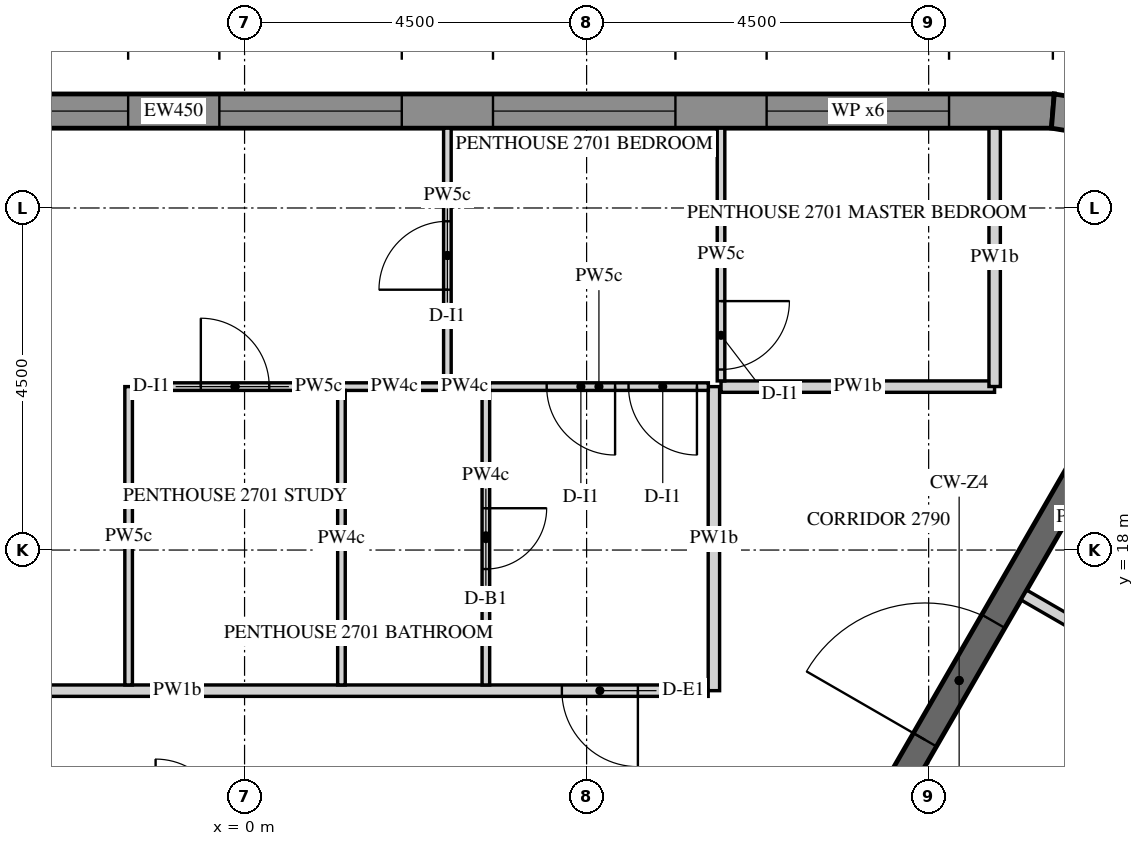
"""IFC4 building model, lengths in metres.
Left out: names, types, materials, properties, quantities, classifications, styles, units other than length and angle.
Written with IfcOpenShell. Run it as: python <this file> out.ifc"""

import sys

from ifc_helpers import new_model, si_unit, direction, frame, frame_2d, origin, place, context, subcontext, project, spatial, polyline, rectangle, outline, extrude, element, fill, save


model = new_model("IFC4")
c1 = context("Model", 3, precision=1e-05, world=origin(), true_north=direction((0.0, 1.0)))
c2 = subcontext(c1, "Body", "Model", "MODEL_VIEW")
j1 = project(units=[si_unit("LENGTHUNIT", "METRE"), si_unit("PLANEANGLEUNIT", "RADIAN")], contexts=[c1])
p1 = place(None, origin())
s1 = spatial("IfcSite", under=j1, at=p1, CompositionType="ELEMENT")
p2 = place(p1, origin())
s2 = spatial("IfcBuilding", under=s1, at=p2, CompositionType="ELEMENT")
p3 = place(p2, frame((0.0, 0.0, 353.4)))
s3 = spatial("IfcBuildingStorey", under=s2, at=p3, CompositionType="ELEMENT", Elevation=353.4)
p4 = place(p3, frame((10.634, 23.775, -0.15), z_axis=(0.0, 0.0, 1.0), x_axis=(-1.0, 0.0, 0.0)))
e1 = element("IfcWall", 1, at=p4, inside=s3, PredefinedType="SOLIDWALL", context=c2, shape_type="SweptSolid", body=[
    extrude(outline(polyline([(-0.018, -0.225), (23.153, -0.225), (23.111, 0.225), (0.018, 0.225), (-0.018, -0.225)])), origin(), (0.0, 0.0, 1.0), 3.9),
])
p5 = place(p4, frame((1.366, 0.0, 0.45)))
e2 = element("IfcOpeningElement", 2, at=p5, cuts=e1, PredefinedType="OPENING", context=c2, shape_type="SweptSolid", body=[
    extrude(rectangle(XDim=2.4, YDim=3.0, at=frame_2d((1.2, 1.5))), frame((0.0, 0.235, 0.0), z_axis=(0.0, -1.0, 0.0), x_axis=(1.0, 0.0, 0.0)), (0.0, 0.0, 1.0), 0.47),
])
p6 = place(p4, frame((4.966, 0.0, 0.45)))
e3 = element("IfcOpeningElement", 3, at=p6, cuts=e1, PredefinedType="OPENING", context=c2, shape_type="SweptSolid", body=[
    extrude(rectangle(XDim=2.4, YDim=3.0, at=frame_2d((1.2, 1.5))), frame((0.0, 0.235, 0.0), z_axis=(0.0, -1.0, 0.0), x_axis=(1.0, 0.0, 0.0)), (0.0, 0.0, 1.0), 0.47),
])
p7 = place(p4, frame((8.566, 0.0, 0.45)))
e4 = element("IfcOpeningElement", 4, at=p7, cuts=e1, PredefinedType="OPENING", context=c2, shape_type="SweptSolid", body=[
    extrude(rectangle(XDim=2.4, YDim=3.0, at=frame_2d((1.2, 1.5))), frame((0.0, 0.235, 0.0), z_axis=(0.0, -1.0, 0.0), x_axis=(1.0, 0.0, 0.0)), (0.0, 0.0, 1.0), 0.47),
])
p8 = place(p4, frame((12.166, 0.0, 0.45)))
e5 = element("IfcOpeningElement", 5, at=p8, cuts=e1, PredefinedType="OPENING", context=c2, shape_type="SweptSolid", body=[
    extrude(rectangle(XDim=2.4, YDim=3.0, at=frame_2d((1.2, 1.5))), frame((0.0, 0.235, 0.0), z_axis=(0.0, -1.0, 0.0), x_axis=(1.0, 0.0, 0.0)), (0.0, 0.0, 1.0), 0.47),
])
p9 = place(p4, frame((15.766, 0.0, 0.45)))
e6 = element("IfcOpeningElement", 6, at=p9, cuts=e1, PredefinedType="OPENING", context=c2, shape_type="SweptSolid", body=[
    extrude(rectangle(XDim=2.4, YDim=3.0, at=frame_2d((1.2, 1.5))), frame((0.0, 0.235, 0.0), z_axis=(0.0, -1.0, 0.0), x_axis=(1.0, 0.0, 0.0)), (0.0, 0.0, 1.0), 0.47),
])
p10 = place(p4, frame((19.366, 0.0, 0.45)))
e7 = element("IfcOpeningElement", 7, at=p10, cuts=e1, PredefinedType="OPENING", context=c2, shape_type="SweptSolid", body=[
    extrude(rectangle(XDim=2.4, YDim=3.0, at=frame_2d((1.2, 1.5))), frame((0.0, 0.235, 0.0), z_axis=(0.0, -1.0, 0.0), x_axis=(1.0, 0.0, 0.0)), (0.0, 0.0, 1.0), 0.47),
])
p11 = place(p3, frame((11.843, 23.576, -0.15), z_axis=(0.0, 0.0, 1.0), x_axis=(-0.986773862881, 0.162102879475, 0.0)))
e8 = element("IfcWall", 8, at=p11, inside=s3, PredefinedType="SOLIDWALL", context=c2, shape_type="SweptSolid", body=[
    extrude(outline(polyline([(-0.037, -0.225), (1.243, -0.225), (1.206, 0.225), (0.037, 0.225), (-0.037, -0.225)])), origin(), (0.0, 0.0, 1.0), 3.9),
])
p12 = place(p3, frame((5.773, 10.0, -0.15), z_axis=(0.0, 0.0, 1.0), x_axis=(0.500007911273, 0.866020836161, 0.0)))
e9 = element("IfcWall", 9, at=p12, inside=s3, PredefinedType="SHEAR", context=c2, shape_type="SweptSolid", body=[
    extrude(rectangle(XDim=14.51, YDim=0.35, at=frame_2d((7.255, 0.0))), origin(), (0.0, 0.0, 1.0), 3.9),
])
p13 = place(p12, frame((6.355, 0.0, 0.15)))
e10 = element("IfcOpeningElement", 10, at=p13, cuts=e9, PredefinedType="OPENING", context=c2, shape_type="SweptSolid", body=[
    extrude(rectangle(XDim=1.8, YDim=2.4, at=frame_2d((0.9, 1.2))), frame((0.0, 0.185, 0.0), z_axis=(0.0, -1.0, 0.0), x_axis=(1.0, 0.0, 0.0)), (0.0, 0.0, 1.0), 0.37),
])
p14 = place(p3, frame((6.1, 16.15, 0.0), z_axis=(0.0, 0.0, 1.0), x_axis=(-1.0, 0.0, 0.0)))
e11 = element("IfcWall", 11, at=p14, inside=s3, PredefinedType="PARTITIONING", context=c2, shape_type="SweptSolid", body=[
    extrude(rectangle(XDim=13.966, YDim=0.15, at=frame_2d((6.983, 0.0))), origin(), (0.0, 0.0, 1.0), 2.82),
])
p15 = place(p14, frame((0.925, 0.0, 0.0)))
e12 = element("IfcOpeningElement", 12, at=p15, cuts=e11, PredefinedType="OPENING", context=c2, shape_type="SweptSolid", body=[
    extrude(rectangle(XDim=1.0, YDim=2.1, at=frame_2d((0.5, 1.05))), frame((0.0, 0.085, 0.0), z_axis=(0.0, -1.0, 0.0), x_axis=(1.0, 0.0, 0.0)), (0.0, 0.0, 1.0), 0.17),
])
p16 = place(p3, frame((6.175, 20.15, 0.0), z_axis=(0.0, 0.0, 1.0), x_axis=(0.0, -1.0, 0.0)))
e13 = element("IfcWall", 13, at=p16, inside=s3, PredefinedType="PARTITIONING", context=c2, shape_type="SweptSolid", body=[
    extrude(rectangle(XDim=4.0, YDim=0.15, at=frame_2d((2.0, 0.0))), origin(), (0.0, 0.0, 1.0), 2.82),
])
p17 = place(p3, frame((9.867, 20.15, 0.0), z_axis=(0.0, 0.0, 1.0), x_axis=(-1.0, 0.0, 0.0)))
e14 = element("IfcWall", 14, at=p17, inside=s3, PredefinedType="PARTITIONING", context=c2, shape_type="SweptSolid", body=[
    extrude(rectangle(XDim=3.599, YDim=0.15, at=frame_2d((1.799, 0.0))), origin(), (0.0, 0.0, 1.0), 2.82),
])
p18 = place(p3, frame((9.868, 23.55, 0.0), z_axis=(0.0, 0.0, 1.0), x_axis=(0.0, -1.0, 0.0)))
e15 = element("IfcWall", 15, at=p18, inside=s3, PredefinedType="PARTITIONING", context=c2, shape_type="SweptSolid", body=[
    extrude(rectangle(XDim=3.399, YDim=0.15, at=frame_2d((1.699, 0.0))), origin(), (0.0, 0.0, 1.0), 2.82),
])
p19 = place(p3, frame((9.142, 11.885, 0.0), z_axis=(0.0, 0.0, 1.0), x_axis=(0.500004822225, 0.866022619654, 0.0)))
e16 = element("IfcWall", 16, at=p19, inside=s3, PredefinedType="PARTITIONING", context=c2, shape_type="SweptSolid", body=[
    extrude(rectangle(XDim=5.339, YDim=0.15, at=frame_2d((2.669, 0.0))), origin(), (0.0, 0.0, 1.0), 2.82),
])
p20 = place(p3, frame((11.747, 16.546, 0.0), z_axis=(0.0, 0.0, 1.0), x_axis=(-0.866013532718, 0.500020560727, 0.0)))
e17 = element("IfcWall", 17, at=p20, inside=s3, PredefinedType="PARTITIONING", context=c2, shape_type="SweptSolid", body=[
    extrude(rectangle(XDim=1.725, YDim=0.15, at=frame_2d((0.863, 0.0))), origin(), (0.0, 0.0, 1.0), 2.82),
])
p21 = place(p3, frame((1.275, 20.15, 0.0), z_axis=(0.0, 0.0, 1.0), x_axis=(1.0, 0.0, 0.0)))
e18 = element("IfcWall", 18, at=p21, inside=s3, PredefinedType="PARTITIONING", context=c2, shape_type="SweptSolid", body=[
    extrude(rectangle(XDim=1.396, YDim=0.1, at=frame_2d((0.698, 0.0))), origin(), (0.0, 0.0, 1.0), 2.82),
])
p22 = place(p3, frame((2.668, 20.2, 0.0), z_axis=(0.0, 0.0, 1.0), x_axis=(0.0, 1.0, 0.0)))
e19 = element("IfcWall", 19, at=p22, inside=s3, PredefinedType="PARTITIONING", context=c2, shape_type="SweptSolid", body=[
    extrude(rectangle(XDim=3.35, YDim=0.1, at=frame_2d((1.675, 0.0))), origin(), (0.0, 0.0, 1.0), 2.82),
])
p23 = place(p22, frame((1.225, 0.0, 0.0)))
e20 = element("IfcOpeningElement", 20, at=p23, cuts=e19, PredefinedType="OPENING", context=c2, shape_type="SweptSolid", body=[
    extrude(rectangle(XDim=0.9, YDim=2.1, at=frame_2d((0.45, 1.05))), frame((0.0, 0.06, 0.0), z_axis=(0.0, -1.0, 0.0), x_axis=(1.0, 0.0, 0.0)), (0.0, 0.0, 1.0), 0.12),
])
p24 = place(p3, frame((-1.525, 16.225, 0.0), z_axis=(0.0, 0.0, 1.0), x_axis=(0.0, 1.0, 0.0)))
e21 = element("IfcWall", 21, at=p24, inside=s3, PredefinedType="PARTITIONING", context=c2, shape_type="SweptSolid", body=[
    extrude(rectangle(XDim=3.925, YDim=0.1, at=frame_2d((1.962, 0.0))), origin(), (0.0, 0.0, 1.0), 2.82),
])
p25 = place(p3, frame((-1.475, 20.15, 0.0), z_axis=(0.0, 0.0, 1.0), x_axis=(1.0, 0.0, 0.0)))
e22 = element("IfcWall", 22, at=p25, inside=s3, PredefinedType="PARTITIONING", context=c2, shape_type="SweptSolid", body=[
    extrude(rectangle(XDim=2.7, YDim=0.1, at=frame_2d((1.35, 0.0))), origin(), (0.0, 0.0, 1.0), 2.82),
])
p26 = place(p25, frame((0.9, 0.0, 0.0)))
e23 = element("IfcOpeningElement", 23, at=p26, cuts=e22, PredefinedType="OPENING", context=c2, shape_type="SweptSolid", body=[
    extrude(rectangle(XDim=0.9, YDim=2.1, at=frame_2d((0.45, 1.05))), frame((0.0, 0.06, 0.0), z_axis=(0.0, -1.0, 0.0), x_axis=(1.0, 0.0, 0.0)), (0.0, 0.0, 1.0), 0.12),
])
p27 = place(p3, frame((3.175, 20.15, 0.0), z_axis=(0.0, 0.0, 1.0), x_axis=(0.0, -1.0, 0.0)))
e24 = element("IfcWall", 24, at=p27, inside=s3, PredefinedType="PARTITIONING", context=c2, shape_type="SweptSolid", body=[
    extrude(rectangle(XDim=3.925, YDim=0.1, at=frame_2d((1.962, 0.0))), origin(), (0.0, 0.0, 1.0), 2.82),
])
p28 = place(p27, frame((1.6, 0.0, 0.0)))
e25 = element("IfcOpeningElement", 25, at=p28, cuts=e24, PredefinedType="OPENING", context=c2, shape_type="SweptSolid", body=[
    extrude(rectangle(XDim=0.8, YDim=2.1, at=frame_2d((0.4, 1.05))), frame((0.0, 0.06, 0.0), z_axis=(0.0, -1.0, 0.0), x_axis=(1.0, 0.0, 0.0)), (0.0, 0.0, 1.0), 0.12),
])
p29 = place(p3, frame((6.102, 20.15, 0.0), z_axis=(0.0, 0.0, 1.0), x_axis=(-1.0, 0.0, 0.0)))
e26 = element("IfcWall", 26, at=p29, inside=s3, PredefinedType="PARTITIONING", context=c2, shape_type="SweptSolid", body=[
    extrude(rectangle(XDim=2.879, YDim=0.1, at=frame_2d((1.439, 0.0))), origin(), (0.0, 0.0, 1.0), 2.82),
])
p30 = place(p29, frame((0.15, 0.0, 0.0)))
e27 = element("IfcOpeningElement", 27, at=p30, cuts=e26, PredefinedType="OPENING", context=c2, shape_type="SweptSolid", body=[
    extrude(rectangle(XDim=0.9, YDim=2.1, at=frame_2d((0.45, 1.05))), frame((0.0, 0.06, 0.0), z_axis=(0.0, -1.0, 0.0), x_axis=(1.0, 0.0, 0.0)), (0.0, 0.0, 1.0), 0.12),
])
p31 = place(p29, frame((1.227, 0.0, 0.0)))
e28 = element("IfcOpeningElement", 28, at=p31, cuts=e26, PredefinedType="OPENING", context=c2, shape_type="SweptSolid", body=[
    extrude(rectangle(XDim=0.9, YDim=2.1, at=frame_2d((0.45, 1.05))), frame((0.0, 0.06, 0.0), z_axis=(0.0, -1.0, 0.0), x_axis=(1.0, 0.0, 0.0)), (0.0, 0.0, 1.0), 0.12),
])
p32 = place(p3, frame((3.127, 20.15, 0.0), z_axis=(0.0, 0.0, 1.0), x_axis=(-1.0, 0.0, 0.0)))
e29 = element("IfcWall", 29, at=p32, inside=s3, PredefinedType="PARTITIONING", context=c2, shape_type="SweptSolid", body=[
    extrude(rectangle(XDim=0.458, YDim=0.1, at=frame_2d((0.229, 0.0))), origin(), (0.0, 0.0, 1.0), 2.82),
])
p33 = place(p3, frame((1.275, 20.1, 0.0), z_axis=(0.0, 0.0, 1.0), x_axis=(0.0, -1.0, 0.0)))
e30 = element("IfcWall", 30, at=p33, inside=s3, PredefinedType="PARTITIONING", context=c2, shape_type="SweptSolid", body=[
    extrude(rectangle(XDim=3.875, YDim=0.1, at=frame_2d((1.938, 0.0))), origin(), (0.0, 0.0, 1.0), 2.82),
])
p34 = place(p3, frame((6.268, 23.55, 0.0), z_axis=(0.0, 0.0, 1.0), x_axis=(0.0, -1.0, 0.0)))
e31 = element("IfcWall", 31, at=p34, inside=s3, PredefinedType="PARTITIONING", context=c2, shape_type="SweptSolid", body=[
    extrude(rectangle(XDim=3.325, YDim=0.1, at=frame_2d((1.663, 0.0))), origin(), (0.0, 0.0, 1.0), 2.82),
])
p35 = place(p34, frame((2.275, 0.0, 0.0)))
e32 = element("IfcOpeningElement", 32, at=p35, cuts=e31, PredefinedType="OPENING", context=c2, shape_type="SweptSolid", body=[
    extrude(rectangle(XDim=0.9, YDim=2.1, at=frame_2d((0.45, 1.05))), frame((0.0, 0.06, 0.0), z_axis=(0.0, -1.0, 0.0), x_axis=(1.0, 0.0, 0.0)), (0.0, 0.0, 1.0), 0.12),
])
p36 = place(p5, frame((0.0, 0.155, 0.0)))
e33 = element("IfcWindow", 33, at=p36, inside=s3, PartitioningType="DOUBLE_PANEL_VERTICAL", PredefinedType="WINDOW", context=c2, shape_type="SweptSolid", body=[
    extrude(rectangle(XDim=2.4, YDim=3.0, at=frame_2d((1.2, 1.5))), frame((0.0, 0.03, 0.0), z_axis=(0.0, -1.0, 0.0), x_axis=(1.0, 0.0, 0.0)), (0.0, 0.0, 1.0), 0.06),
])
fill(e2, e33)
p37 = place(p6, frame((0.0, 0.155, 0.0)))
e34 = element("IfcWindow", 34, at=p37, inside=s3, PartitioningType="DOUBLE_PANEL_VERTICAL", PredefinedType="WINDOW", context=c2, shape_type="SweptSolid", body=[
    extrude(rectangle(XDim=2.4, YDim=3.0, at=frame_2d((1.2, 1.5))), frame((0.0, 0.03, 0.0), z_axis=(0.0, -1.0, 0.0), x_axis=(1.0, 0.0, 0.0)), (0.0, 0.0, 1.0), 0.06),
])
fill(e3, e34)
p38 = place(p7, frame((0.0, 0.155, 0.0)))
e35 = element("IfcWindow", 35, at=p38, inside=s3, PartitioningType="DOUBLE_PANEL_VERTICAL", PredefinedType="WINDOW", context=c2, shape_type="SweptSolid", body=[
    extrude(rectangle(XDim=2.4, YDim=3.0, at=frame_2d((1.2, 1.5))), frame((0.0, 0.03, 0.0), z_axis=(0.0, -1.0, 0.0), x_axis=(1.0, 0.0, 0.0)), (0.0, 0.0, 1.0), 0.06),
])
fill(e4, e35)
p39 = place(p8, frame((0.0, 0.155, 0.0)))
e36 = element("IfcWindow", 36, at=p39, inside=s3, PartitioningType="DOUBLE_PANEL_VERTICAL", PredefinedType="WINDOW", context=c2, shape_type="SweptSolid", body=[
    extrude(rectangle(XDim=2.4, YDim=3.0, at=frame_2d((1.2, 1.5))), frame((0.0, 0.03, 0.0), z_axis=(0.0, -1.0, 0.0), x_axis=(1.0, 0.0, 0.0)), (0.0, 0.0, 1.0), 0.06),
])
fill(e5, e36)
p40 = place(p13, origin())
e37 = element("IfcDoor", 37, at=p40, inside=s3, OperationType="DOUBLE_DOOR_SINGLE_SWING", PredefinedType="DOOR", context=c2, shape_type="SweptSolid", body=[
    extrude(rectangle(XDim=1.8, YDim=2.4, at=frame_2d((0.9, 1.2))), frame((0.0, 0.025, 0.0), z_axis=(0.0, -1.0, 0.0), x_axis=(1.0, 0.0, 0.0)), (0.0, 0.0, 1.0), 0.05),
])
fill(e10, e37)
p41 = place(p15, origin())
e38 = element("IfcDoor", 38, at=p41, inside=s3, OperationType="SINGLE_SWING_RIGHT", PredefinedType="DOOR", context=c2, shape_type="SweptSolid", body=[
    extrude(rectangle(XDim=1.0, YDim=2.1, at=frame_2d((0.5, 1.05))), frame((0.0, 0.025, 0.0), z_axis=(0.0, -1.0, 0.0), x_axis=(1.0, 0.0, 0.0)), (0.0, 0.0, 1.0), 0.05),
])
fill(e12, e38)
p42 = place(p28, origin())
e39 = element("IfcDoor", 39, at=p42, inside=s3, OperationType="SINGLE_SWING_LEFT", PredefinedType="DOOR", context=c2, shape_type="SweptSolid", body=[
    extrude(rectangle(XDim=0.8, YDim=2.1, at=frame_2d((0.4, 1.05))), frame((0.0, 0.025, 0.0), z_axis=(0.0, -1.0, 0.0), x_axis=(1.0, 0.0, 0.0)), (0.0, 0.0, 1.0), 0.05),
])
fill(e25, e39)
p43 = place(p30, origin())
e40 = element("IfcDoor", 40, at=p43, inside=s3, OperationType="SINGLE_SWING_LEFT", PredefinedType="DOOR", context=c2, shape_type="SweptSolid", body=[
    extrude(rectangle(XDim=0.9, YDim=2.1, at=frame_2d((0.45, 1.05))), frame((0.0, 0.025, 0.0), z_axis=(0.0, -1.0, 0.0), x_axis=(1.0, 0.0, 0.0)), (0.0, 0.0, 1.0), 0.05),
])
fill(e27, e40)
p44 = place(p35, origin())
e41 = element("IfcDoor", 41, at=p44, inside=s3, OperationType="SINGLE_SWING_RIGHT", PredefinedType="DOOR", context=c2, shape_type="SweptSolid", body=[
    extrude(rectangle(XDim=0.9, YDim=2.1, at=frame_2d((0.45, 1.05))), frame((0.0, 0.025, 0.0), z_axis=(0.0, -1.0, 0.0), x_axis=(1.0, 0.0, 0.0)), (0.0, 0.0, 1.0), 0.05),
])
fill(e32, e41)
p45 = place(p31, origin())
e42 = element("IfcDoor", 42, at=p45, inside=s3, OperationType="SINGLE_SWING_LEFT", PredefinedType="DOOR", context=c2, shape_type="SweptSolid", body=[
    extrude(rectangle(XDim=0.9, YDim=2.1, at=frame_2d((0.45, 1.05))), frame((0.0, 0.025, 0.0), z_axis=(0.0, -1.0, 0.0), x_axis=(1.0, 0.0, 0.0)), (0.0, 0.0, 1.0), 0.05),
])
fill(e28, e42)
p46 = place(p26, origin())
e43 = element("IfcDoor", 43, at=p46, inside=s3, OperationType="SINGLE_SWING_LEFT", PredefinedType="DOOR", context=c2, shape_type="SweptSolid", body=[
    extrude(rectangle(XDim=0.9, YDim=2.1, at=frame_2d((0.45, 1.05))), frame((0.0, 0.025, 0.0), z_axis=(0.0, -1.0, 0.0), x_axis=(1.0, 0.0, 0.0)), (0.0, 0.0, 1.0), 0.05),
])
fill(e23, e43)
p47 = place(p23, origin())
e44 = element("IfcDoor", 44, at=p47, inside=s3, OperationType="SINGLE_SWING_LEFT", PredefinedType="DOOR", context=c2, shape_type="SweptSolid", body=[
    extrude(rectangle(XDim=0.9, YDim=2.1, at=frame_2d((0.45, 1.05))), frame((0.0, 0.025, 0.0), z_axis=(0.0, -1.0, 0.0), x_axis=(1.0, 0.0, 0.0)), (0.0, 0.0, 1.0), 0.05),
])
fill(e20, e44)
save(model, sys.argv[1])
